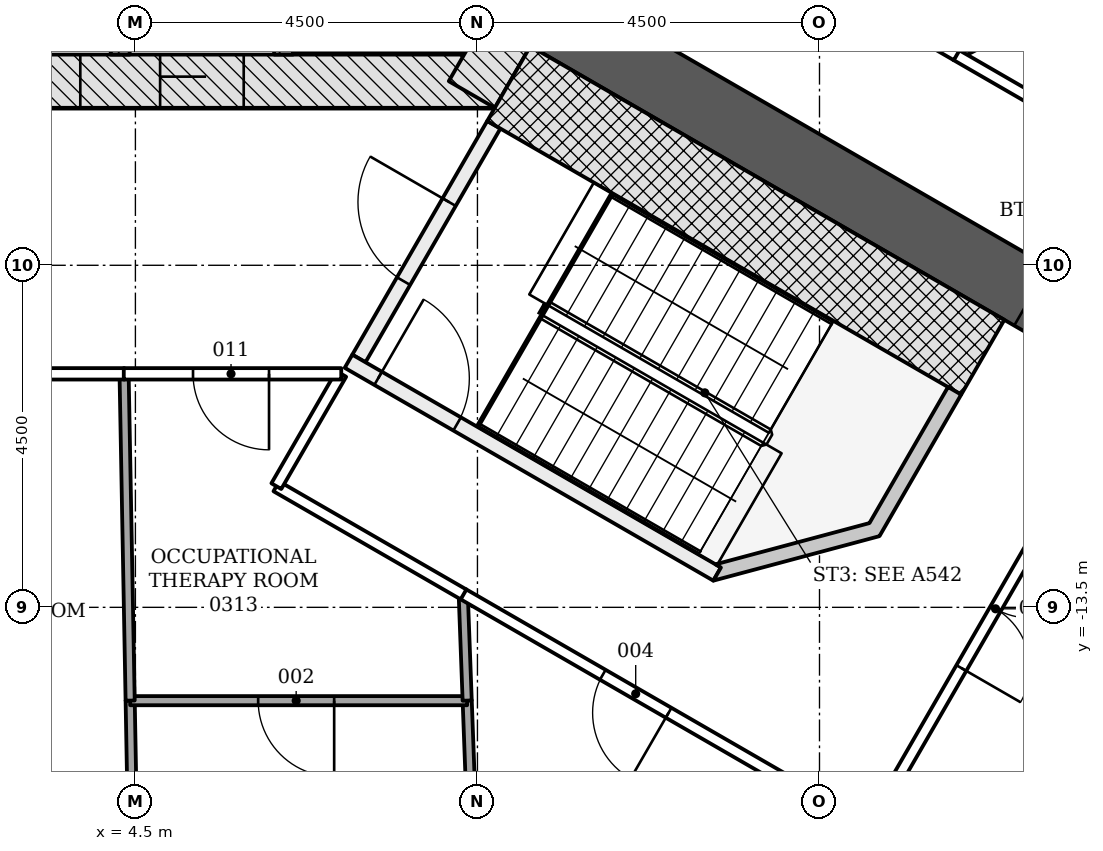
"""IFC4 building model, lengths in metres.
Left out: names, types, materials, properties, quantities, classifications, styles, units other than length and angle.
Written with IfcOpenShell. Run it as: python <this file> out.ifc"""

import sys

from ifc_helpers import new_model, si_unit, direction, frame, frame_2d, origin, place, context, subcontext, project, spatial, polyline, rectangle, outline, extrude, element, fill, save


model = new_model("IFC4")
c1 = context("Model", 3, precision=1e-05, world=origin(), true_north=direction((0.0, 1.0)))
c2 = subcontext(c1, "Body", "Model", "MODEL_VIEW")
j1 = project(units=[si_unit("LENGTHUNIT", "METRE"), si_unit("PLANEANGLEUNIT", "RADIAN")], contexts=[c1])
p1 = place(None, origin())
s1 = spatial("IfcSite", under=j1, at=p1, CompositionType="ELEMENT")
p2 = place(p1, origin())
s2 = spatial("IfcBuilding", under=s1, at=p2, CompositionType="ELEMENT")
p3 = place(p2, frame((0.0, 0.0, 15.0)))
s3 = spatial("IfcBuildingStorey", under=s2, at=p3, CompositionType="ELEMENT", Elevation=15.0)
p4 = place(p3, frame((-9.229, -6.578, -0.25), z_axis=(0.0, 0.0, 1.0), x_axis=(1.0, 0.0, 0.0)))
e1 = element("IfcWall", 1, at=p4, inside=s3, PredefinedType="SHEAR", context=c2, shape_type="SweptSolid", body=[
    extrude(rectangle(XDim=18.458, YDim=0.7, at=frame_2d((9.229, 0.0))), origin(), (0.0, 0.0, 1.0), 4.5),
])
p5 = place(p4, frame((3.304, 0.0, 0.25)))
e2 = element("IfcOpeningElement", 2, at=p5, cuts=e1, PredefinedType="OPENING", context=c2, shape_type="SweptSolid", body=[
    extrude(rectangle(XDim=1.1, YDim=2.1, at=frame_2d((0.55, 1.05))), frame((0.0, 0.36, 0.0), z_axis=(0.0, -1.0, 0.0), x_axis=(1.0, 0.0, 0.0)), (0.0, 0.0, 1.0), 0.72),
])
p6 = place(p4, frame((5.454, 0.0, 0.25)))
e3 = element("IfcOpeningElement", 3, at=p6, cuts=e1, PredefinedType="OPENING", context=c2, shape_type="SweptSolid", body=[
    extrude(rectangle(XDim=1.1, YDim=2.1, at=frame_2d((0.55, 1.05))), frame((0.0, 0.36, 0.0), z_axis=(0.0, -1.0, 0.0), x_axis=(1.0, 0.0, 0.0)), (0.0, 0.0, 1.0), 0.72),
])
p7 = place(p4, frame((7.604, 0.0, 0.25)))
e4 = element("IfcOpeningElement", 4, at=p7, cuts=e1, PredefinedType="OPENING", context=c2, shape_type="SweptSolid", body=[
    extrude(rectangle(XDim=1.1, YDim=2.1, at=frame_2d((0.55, 1.05))), frame((0.0, 0.36, 0.0), z_axis=(0.0, -1.0, 0.0), x_axis=(1.0, 0.0, 0.0)), (0.0, 0.0, 1.0), 0.72),
])
p8 = place(p4, frame((9.754, 0.0, 0.25)))
e5 = element("IfcOpeningElement", 5, at=p8, cuts=e1, PredefinedType="OPENING", context=c2, shape_type="SweptSolid", body=[
    extrude(rectangle(XDim=1.1, YDim=2.1, at=frame_2d((0.55, 1.05))), frame((0.0, 0.36, 0.0), z_axis=(0.0, -1.0, 0.0), x_axis=(1.0, 0.0, 0.0)), (0.0, 0.0, 1.0), 0.72),
])
p9 = place(p4, frame((11.904, 0.0, 0.25)))
e6 = element("IfcOpeningElement", 6, at=p9, cuts=e1, PredefinedType="OPENING", context=c2, shape_type="SweptSolid", body=[
    extrude(rectangle(XDim=1.1, YDim=2.1, at=frame_2d((0.55, 1.05))), frame((0.0, 0.36, 0.0), z_axis=(0.0, -1.0, 0.0), x_axis=(1.0, 0.0, 0.0)), (0.0, 0.0, 1.0), 0.72),
])
p10 = place(p4, frame((14.054, 0.0, 0.25)))
e7 = element("IfcOpeningElement", 7, at=p10, cuts=e1, PredefinedType="OPENING", context=c2, shape_type="SweptSolid", body=[
    extrude(rectangle(XDim=1.1, YDim=2.1, at=frame_2d((0.55, 1.05))), frame((0.0, 0.36, 0.0), z_axis=(0.0, -1.0, 0.0), x_axis=(1.0, 0.0, 0.0)), (0.0, 0.0, 1.0), 0.72),
])
p11 = place(p4, frame((1.079, 0.0, 0.25)))
e8 = element("IfcOpeningElement", 8, at=p11, cuts=e1, PredefinedType="OPENING", context=c2, shape_type="SweptSolid", body=[
    extrude(rectangle(XDim=0.9, YDim=2.1, at=frame_2d((0.45, 1.05))), frame((0.0, 0.36, 0.0), z_axis=(0.0, -1.0, 0.0), x_axis=(1.0, 0.0, 0.0)), (0.0, 0.0, 1.0), 0.72),
])
p12 = place(p3, frame((8.926, -6.753, -0.25), z_axis=(0.0, 0.0, 1.0), x_axis=(0.500042739161, 0.866000726912, 0.0)))
e9 = element("IfcWall", 9, at=p12, inside=s3, PredefinedType="SHEAR", context=c2, shape_type="SweptSolid", body=[
    extrude(rectangle(XDim=2.771, YDim=0.7, at=frame_2d((1.386, 0.0))), origin(), (0.0, 0.0, 1.0), 4.5),
])
p13 = place(p3, frame((9.922, -5.728, -0.25), z_axis=(0.0, 0.0, 1.0), x_axis=(0.866028046028, -0.499995423472, 0.0)))
e10 = element("IfcWall", 10, at=p13, inside=s3, PredefinedType="SHEAR", context=c2, shape_type="SweptSolid", body=[
    extrude(rectangle(XDim=14.633, YDim=0.9, at=frame_2d((7.316, 0.0))), origin(), (0.0, 0.0, 1.0), 4.5),
])
p14 = place(p13, frame((7.35, 0.0, 0.25)))
e11 = element("IfcOpeningElement", 11, at=p14, cuts=e10, PredefinedType="OPENING", context=c2, shape_type="SweptSolid", body=[
    extrude(rectangle(XDim=1.5, YDim=2.1, at=frame_2d((0.75, 1.05))), frame((0.0, 0.46, 0.0), z_axis=(0.0, -1.0, 0.0), x_axis=(1.0, 0.0, 0.0)), (0.0, 0.0, 1.0), 0.92),
])
for number, where, z_axis, x_axis in (
    (12, (4.3, -6.228, -0.25), (0.0, 0.0, 1.0), (0.0, 1.0, 0.0)),
    (13, (6.45, -6.228, -0.25), (0.0, 0.0, 1.0), (0.0, 1.0, 0.0)),
):
    element("IfcWall", number, at=place(p3, frame(where, z_axis=z_axis, x_axis=x_axis)), inside=s3, PredefinedType="PARTITIONING", context=c2, shape_type="SweptSolid", body=[
        extrude(rectangle(XDim=2.5, YDim=0.25, at=frame_2d((1.25, 0.0))), origin(), (0.0, 0.0, 1.0), 4.5),
    ])
p15 = place(p3, frame((7.44, -10.226, -0.25), z_axis=(0.0, 0.0, 1.0), x_axis=(0.500022077904, 0.866012656725, 0.0)))
e14 = element("IfcWall", 14, at=p15, inside=s3, PredefinedType="SHEAR", context=c2, shape_type="SweptSolid", body=[
    extrude(rectangle(XDim=3.55, YDim=0.2, at=frame_2d((1.775, 0.0))), origin(), (0.0, 0.0, 1.0), 4.5),
])
p16 = place(p15, frame((1.175, 0.0, 0.25)))
e15 = element("IfcOpeningElement", 15, at=p16, cuts=e14, PredefinedType="OPENING", context=c2, shape_type="SweptSolid", body=[
    extrude(rectangle(XDim=1.2, YDim=2.1, at=frame_2d((0.6, 1.05))), frame((0.0, 0.11, 0.0), z_axis=(0.0, -1.0, 0.0), x_axis=(1.0, 0.0, 0.0)), (0.0, 0.0, 1.0), 0.22),
])
p17 = place(p3, frame((7.304, -10.262, -0.25), z_axis=(0.0, 0.0, 1.0), x_axis=(0.866026594901, -0.49999793692, 0.0)))
e16 = element("IfcWall", 16, at=p17, inside=s3, PredefinedType="SHEAR", context=c2, shape_type="SweptSolid", body=[
    extrude(rectangle(XDim=5.6, YDim=0.2, at=frame_2d((2.8, 0.0))), origin(), (0.0, 0.0, 1.0), 4.5),
])
p18 = place(p17, frame((0.45, 0.0, 0.25)))
e17 = element("IfcOpeningElement", 17, at=p18, cuts=e16, PredefinedType="OPENING", context=c2, shape_type="SweptSolid", body=[
    extrude(rectangle(XDim=1.2, YDim=2.1, at=frame_2d((0.6, 1.05))), frame((0.0, 0.11, 0.0), z_axis=(0.0, -1.0, 0.0), x_axis=(1.0, 0.0, 0.0)), (0.0, 0.0, 1.0), 0.22),
])
p19 = place(p3, frame((9.413, -6.61, -0.25), z_axis=(0.0, 0.0, 1.0), x_axis=(0.866018442252, -0.500012057535, 0.0)))
e18 = element("IfcWall", 18, at=p19, inside=s3, PredefinedType="SHEAR", context=c2, shape_type="SweptSolid", body=[
    extrude(rectangle(XDim=7.2, YDim=1.136, at=frame_2d((3.6, 0.0))), origin(), (0.0, 0.0, 1.0), 4.5),
])
p20 = place(p3, frame((0.0, 0.0, -0.25)))
e19 = element("IfcWall", 19, at=p20, inside=s3, PredefinedType="SHEAR", context=c2, shape_type="SweptSolid", body=[
    extrude(outline(polyline([(12.104, -13.149), (14.289, -12.563), (15.364, -10.701), (15.191, -10.601), (14.157, -12.392), (12.132, -12.934), (12.204, -12.976), (12.204, -12.976), (12.204, -12.976), (12.204, -12.976), (12.204, -12.976), (12.204, -12.976), (12.204, -12.976), (12.204, -12.976), (12.204, -12.976), (12.204, -12.976), (12.204, -12.976), (12.204, -12.976), (12.204, -12.976), (12.204, -12.976), (12.204, -12.976), (12.204, -12.976), (12.204, -12.976), (12.104, -13.149)])), origin(), (0.0, 0.0, 1.0), 4.5),
])
p21 = place(p3, frame((8.978, -17.767, 0.0), z_axis=(0.0, 0.0, 1.0), x_axis=(-0.037121380275, 0.99931076404, 0.0)))
e20 = element("IfcWall", 20, at=p21, inside=s3, PredefinedType="PARTITIONING", context=c2, shape_type="SweptSolid", body=[
    extrude(rectangle(XDim=3.045, YDim=0.12, at=frame_2d((1.522, 0.0))), origin(), (0.0, 0.0, 1.0), 3.638),
])
p22 = place(p3, frame((4.431, -14.724, 0.0), z_axis=(0.0, 0.0, 1.0), x_axis=(0.018546556452, -0.99982799783, 0.0)))
e21 = element("IfcWall", 21, at=p22, inside=s3, PredefinedType="PARTITIONING", context=c2, shape_type="SweptSolid", body=[
    extrude(rectangle(XDim=1.303, YDim=0.12, at=frame_2d((0.652, 0.0))), origin(), (0.0, 0.0, 1.0), 3.638),
])
p23 = place(p3, frame((8.865, -14.728, 0.0), z_axis=(0.0, 0.0, 1.0), x_axis=(-1.0, 0.0, 0.0)))
e22 = element("IfcWall", 22, at=p23, inside=s3, PredefinedType="PARTITIONING", context=c2, shape_type="SweptSolid", body=[
    extrude(rectangle(XDim=4.434, YDim=0.12, at=frame_2d((2.217, 0.0))), origin(), (0.0, 0.0, 1.0), 3.638),
])
p24 = place(p23, frame((1.75, 0.0, 0.0)))
e23 = element("IfcOpeningElement", 23, at=p24, cuts=e22, PredefinedType="OPENING", context=c2, shape_type="SweptSolid", body=[
    extrude(rectangle(XDim=1.0, YDim=2.1, at=frame_2d((0.5, 1.05))), frame((0.0, 0.07, 0.0), z_axis=(0.0, -1.0, 0.0), x_axis=(1.0, 0.0, 0.0)), (0.0, 0.0, 1.0), 0.14),
])
p25 = place(p3, frame((8.813, -13.328, 0.0), z_axis=(0.0, 0.0, 1.0), x_axis=(0.037140645658, -0.999310048203, 0.0)))
e24 = element("IfcWall", 24, at=p25, inside=s3, PredefinedType="PARTITIONING", context=c2, shape_type="SweptSolid", body=[
    extrude(rectangle(XDim=1.4, YDim=0.12, at=frame_2d((0.7, 0.0))), origin(), (0.0, 0.0, 1.0), 3.638),
])
p26 = place(p3, frame((13.377, -15.962, 0.0), z_axis=(0.0, 0.0, 1.0), x_axis=(-0.866049926484, 0.499957523033, 0.0)))
e25 = element("IfcWall", 25, at=p26, inside=s3, PredefinedType="PARTITIONING", context=c2, shape_type="SweptSolid", body=[
    extrude(rectangle(XDim=5.274, YDim=0.15, at=frame_2d((2.637, 0.0))), origin(), (0.0, 0.0, 1.0), 3.638),
])
p27 = place(p26, frame((2.15, 0.0, 0.0)))
e26 = element("IfcOpeningElement", 26, at=p27, cuts=e25, PredefinedType="OPENING", context=c2, shape_type="SweptSolid", body=[
    extrude(rectangle(XDim=1.0, YDim=2.1, at=frame_2d((0.5, 1.05))), frame((0.0, 0.085, 0.0), z_axis=(0.0, -1.0, 0.0), x_axis=(1.0, 0.0, 0.0)), (0.0, 0.0, 1.0), 0.17),
])
p28 = place(p3, frame((17.491, -10.618, 0.0), z_axis=(0.0, 0.0, 1.0), x_axis=(-0.499969057507, -0.866043267704, 0.0)))
e27 = element("IfcWall", 27, at=p28, inside=s3, PredefinedType="PARTITIONING", context=c2, shape_type="SweptSolid", body=[
    extrude(rectangle(XDim=6.685, YDim=0.15, at=frame_2d((3.342, 0.0))), origin(), (0.0, 0.0, 1.0), 3.638),
])
p29 = place(p28, frame((2.45, 0.0, 0.0)))
e28 = element("IfcOpeningElement", 28, at=p29, cuts=e27, PredefinedType="OPENING", context=c2, shape_type="SweptSolid", body=[
    extrude(rectangle(XDim=1.8, YDim=2.1, at=frame_2d((0.9, 1.05))), frame((0.0, 0.085, 0.0), z_axis=(0.0, -1.0, 0.0), x_axis=(1.0, 0.0, 0.0)), (0.0, 0.0, 1.0), 0.17),
])
p30 = place(p3, frame((4.431, -14.727, 0.0), z_axis=(0.0, 0.0, 1.0), x_axis=(-0.018571065409, 0.999827542894, 0.0)))
e29 = element("IfcWall", 29, at=p30, inside=s3, PredefinedType="PARTITIONING", context=c2, shape_type="SweptSolid", body=[
    extrude(rectangle(XDim=4.299, YDim=0.12, at=frame_2d((2.149, 0.0))), origin(), (0.0, 0.0, 1.0), 3.638),
])
p31 = place(p3, frame((4.355, -10.428, 0.0), z_axis=(0.0, 0.0, 1.0), x_axis=(-1.0, 0.0, 0.0)))
e30 = element("IfcWall", 30, at=p31, inside=s3, PredefinedType="PARTITIONING", context=c2, shape_type="SweptSolid", body=[
    extrude(rectangle(XDim=4.359, YDim=0.15, at=frame_2d((2.179, 0.0))), origin(), (0.0, 0.0, 1.0), 3.638),
])
p32 = place(p31, frame((1.65, 0.0, 0.0)))
e31 = element("IfcOpeningElement", 31, at=p32, cuts=e30, PredefinedType="OPENING", context=c2, shape_type="SweptSolid", body=[
    extrude(rectangle(XDim=1.0, YDim=2.1, at=frame_2d((0.5, 1.05))), frame((0.0, 0.085, 0.0), z_axis=(0.0, -1.0, 0.0), x_axis=(1.0, 0.0, 0.0)), (0.0, 0.0, 1.0), 0.17),
])
p33 = place(p3, frame((8.817, -13.33, 0.0), z_axis=(0.0, 0.0, 1.0), x_axis=(-0.865999736111, 0.50004445508, 0.0)))
e32 = element("IfcWall", 32, at=p33, inside=s3, PredefinedType="PARTITIONING", context=c2, shape_type="SweptSolid", body=[
    extrude(rectangle(XDim=2.844, YDim=0.15, at=frame_2d((1.422, 0.0))), origin(), (0.0, 0.0, 1.0), 3.638),
])
p34 = place(p3, frame((6.354, -11.906, 0.0), z_axis=(0.0, 0.0, 1.0), x_axis=(0.500539815233, 0.865713516913, 0.0)))
e33 = element("IfcWall", 33, at=p34, inside=s3, PredefinedType="PARTITIONING", context=c2, shape_type="SweptSolid", body=[
    extrude(rectangle(XDim=1.706, YDim=0.15, at=frame_2d((0.853, 0.0))), origin(), (0.0, 0.0, 1.0), 4.25),
])
p35 = place(p3, frame((7.208, -10.428, 0.0), z_axis=(0.0, 0.0, 1.0), x_axis=(-1.0, 0.0, 0.0)))
e34 = element("IfcWall", 34, at=p35, inside=s3, PredefinedType="PARTITIONING", context=c2, shape_type="SweptSolid", body=[
    extrude(rectangle(XDim=2.861, YDim=0.15, at=frame_2d((1.431, 0.0))), origin(), (0.0, 0.0, 1.0), 3.638),
])
p36 = place(p35, frame((0.95, 0.0, 0.0)))
e35 = element("IfcOpeningElement", 35, at=p36, cuts=e34, PredefinedType="OPENING", context=c2, shape_type="SweptSolid", body=[
    extrude(rectangle(XDim=1.0, YDim=2.1, at=frame_2d((0.5, 1.05))), frame((0.0, 0.085, 0.0), z_axis=(0.0, -1.0, 0.0), x_axis=(1.0, 0.0, 0.0)), (0.0, 0.0, 1.0), 0.17),
])
p37 = place(p3, frame((19.942, -3.888, 0.0), z_axis=(0.0, 0.0, 1.0), x_axis=(-0.89243804137, -0.451169970539, 0.0)))
e36 = element("IfcWall", 36, at=p37, inside=s3, PredefinedType="PARTITIONING", context=c2, shape_type="SweptSolid", body=[
    extrude(rectangle(XDim=5.202, YDim=0.12, at=frame_2d((2.601, 0.0))), origin(), (0.0, 0.0, 1.0), 3.638),
])
p38 = place(p3, frame((15.295, -6.232, 0.0), z_axis=(0.0, 0.0, 1.0), x_axis=(0.865991915229, -0.500057999394, 0.0)))
e37 = element("IfcWall", 37, at=p38, inside=s3, PredefinedType="PARTITIONING", context=c2, shape_type="SweptSolid", body=[
    extrude(rectangle(XDim=4.094, YDim=0.15, at=frame_2d((2.047, 0.0))), origin(), (0.0, 0.0, 1.0), 3.638),
])
p39 = place(p38, frame((1.15, 0.0, 0.0)))
e38 = element("IfcOpeningElement", 38, at=p39, cuts=e37, PredefinedType="OPENING", context=c2, shape_type="SweptSolid", body=[
    extrude(rectangle(XDim=1.8, YDim=2.1, at=frame_2d((0.9, 1.05))), frame((0.0, 0.085, 0.0), z_axis=(0.0, -1.0, 0.0), x_axis=(1.0, 0.0, 0.0)), (0.0, 0.0, 1.0), 0.17),
])
p40 = place(p3, frame((14.078, -5.529, 0.0), z_axis=(0.0, 0.0, 1.0), x_axis=(0.865984561414, -0.500070734389, 0.0)))
e39 = element("IfcWall", 39, at=p40, inside=s3, PredefinedType="PARTITIONING", context=c2, shape_type="SweptSolid", body=[
    extrude(rectangle(XDim=1.416, YDim=0.15, at=frame_2d((0.708, 0.0))), origin(), (0.0, 0.0, 1.0), 3.638),
])
p41 = place(p9, origin())
e40 = element("IfcDoor", 40, at=p41, inside=s3, OperationType="DOUBLE_DOOR_SLIDING", PredefinedType="DOOR", context=c2, shape_type="SweptSolid", body=[
    extrude(rectangle(XDim=1.1, YDim=2.1, at=frame_2d((0.55, 1.05))), frame((0.0, 0.025, 0.0), z_axis=(0.0, -1.0, 0.0), x_axis=(1.0, 0.0, 0.0)), (0.0, 0.0, 1.0), 0.05),
])
fill(e6, e40)
p42 = place(p10, origin())
e41 = element("IfcDoor", 41, at=p42, inside=s3, OperationType="DOUBLE_DOOR_SLIDING", PredefinedType="DOOR", context=c2, shape_type="SweptSolid", body=[
    extrude(rectangle(XDim=1.1, YDim=2.1, at=frame_2d((0.55, 1.05))), frame((0.0, 0.025, 0.0), z_axis=(0.0, -1.0, 0.0), x_axis=(1.0, 0.0, 0.0)), (0.0, 0.0, 1.0), 0.05),
])
fill(e7, e41)
p43 = place(p16, origin())
e42 = element("IfcDoor", 42, at=p43, inside=s3, OperationType="SINGLE_SWING_RIGHT", PredefinedType="DOOR", context=c2, shape_type="SweptSolid", body=[
    extrude(rectangle(XDim=1.2, YDim=2.1, at=frame_2d((0.6, 1.05))), frame((0.0, 0.025, 0.0), z_axis=(0.0, -1.0, 0.0), x_axis=(1.0, 0.0, 0.0)), (0.0, 0.0, 1.0), 0.05),
])
fill(e15, e42)
p44 = place(p18, origin())
e43 = element("IfcDoor", 43, at=p44, inside=s3, OperationType="SINGLE_SWING_LEFT", PredefinedType="DOOR", context=c2, shape_type="SweptSolid", body=[
    extrude(rectangle(XDim=1.2, YDim=2.1, at=frame_2d((0.6, 1.05))), frame((0.0, 0.025, 0.0), z_axis=(0.0, -1.0, 0.0), x_axis=(1.0, 0.0, 0.0)), (0.0, 0.0, 1.0), 0.05),
])
fill(e17, e43)
p45 = place(p24, origin())
e44 = element("IfcDoor", 44, at=p45, inside=s3, OperationType="SINGLE_SWING_RIGHT", PredefinedType="DOOR", context=c2, shape_type="SweptSolid", body=[
    extrude(rectangle(XDim=1.0, YDim=2.1, at=frame_2d((0.5, 1.05))), frame((0.0, 0.025, 0.0), z_axis=(0.0, -1.0, 0.0), x_axis=(1.0, 0.0, 0.0)), (0.0, 0.0, 1.0), 0.05),
])
fill(e23, e44)
p46 = place(p27, origin())
e45 = element("IfcDoor", 45, at=p46, inside=s3, OperationType="SINGLE_SWING_RIGHT", PredefinedType="DOOR", context=c2, shape_type="SweptSolid", body=[
    extrude(rectangle(XDim=1.0, YDim=2.1, at=frame_2d((0.5, 1.05))), frame((0.0, 0.025, 0.0), z_axis=(0.0, -1.0, 0.0), x_axis=(1.0, 0.0, 0.0)), (0.0, 0.0, 1.0), 0.05),
])
fill(e26, e45)
p47 = place(p29, origin())
e46 = element("IfcDoor", 46, at=p47, inside=s3, OperationType="DOUBLE_DOOR_SINGLE_SWING", PredefinedType="DOOR", context=c2, shape_type="SweptSolid", body=[
    extrude(rectangle(XDim=1.8, YDim=2.1, at=frame_2d((0.9, 1.05))), frame((0.0, 0.025, 0.0), z_axis=(0.0, -1.0, 0.0), x_axis=(1.0, 0.0, 0.0)), (0.0, 0.0, 1.0), 0.05),
])
fill(e28, e46)
p48 = place(p36, origin())
e47 = element("IfcDoor", 47, at=p48, inside=s3, OperationType="SINGLE_SWING_RIGHT", PredefinedType="DOOR", context=c2, shape_type="SweptSolid", body=[
    extrude(rectangle(XDim=1.0, YDim=2.1, at=frame_2d((0.5, 1.05))), frame((0.0, 0.025, 0.0), z_axis=(0.0, -1.0, 0.0), x_axis=(1.0, 0.0, 0.0)), (0.0, 0.0, 1.0), 0.05),
])
fill(e35, e47)
save(model, sys.argv[1])
